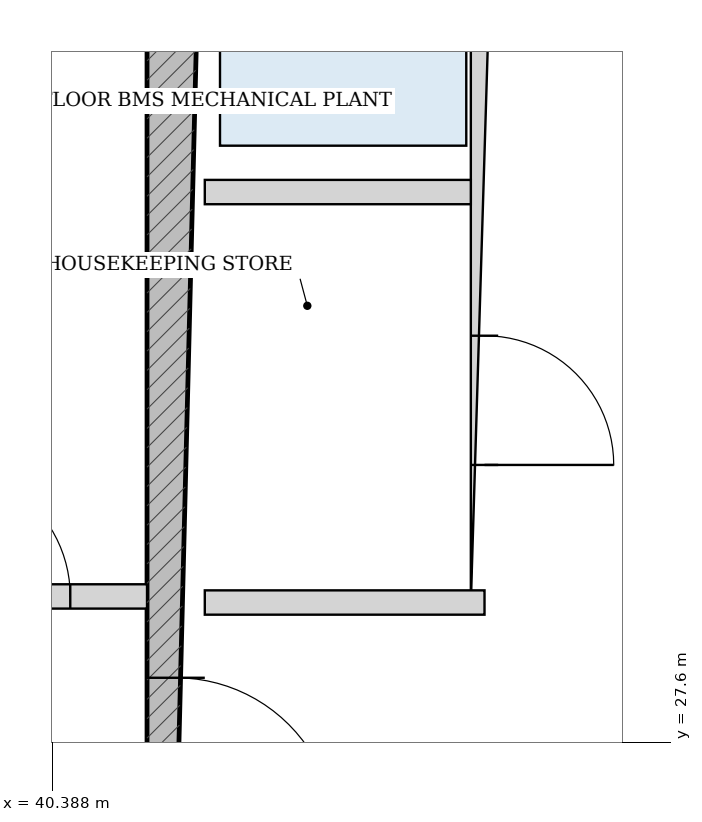
"""IFC4 building model, lengths in metres.
Left out: names, types, materials, properties, quantities, classifications, styles, units other than length and angle.
Written with IfcOpenShell. Run it as: python <this file> out.ifc"""

import sys

from ifc_helpers import new_model, si_unit, direction, frame, frame_2d, origin, place, context, subcontext, project, spatial, rectangle, extrude, source, transform, mapped, element, fill, save


model = new_model("IFC4")
c1 = context("Model", 3, precision=1e-05, world=origin(), true_north=direction((-0.2419218956, 0.970295726276)))
c2 = subcontext(c1, "Body", "Model", "MODEL_VIEW")
j1 = project(units=[si_unit("LENGTHUNIT", "METRE"), si_unit("PLANEANGLEUNIT", "RADIAN")], contexts=[c1])
p1 = place(None, origin())
s1 = spatial("IfcSite", under=j1, at=p1, CompositionType="ELEMENT")
p2 = place(p1, origin())
s2 = spatial("IfcBuilding", under=s1, at=p2, CompositionType="ELEMENT")
p3 = place(p2, frame((0.0, 0.0, 251.95)))
s3 = spatial("IfcBuildingStorey", under=s2, at=p3, CompositionType="ELEMENT", Elevation=251.95)
p4 = place(p3, frame((41.2, 19.175, 0.0), z_axis=(0.0, 0.0, 1.0), x_axis=(0.0, 1.0, 0.0)))
e1 = element("IfcWall", 1, at=p4, inside=s3, PredefinedType="SHEAR", context=c2, shape_type="SweptSolid", body=[
    extrude(rectangle(XDim=15.25, YDim=0.38, at=frame_2d((7.625, 0.0))), origin(), (0.0, 0.0, 1.0), 3.49),
])
p5 = place(p4, frame((7.8, 0.0, 0.0)))
e2 = element("IfcOpeningElement", 2, at=p5, cuts=e1, PredefinedType="OPENING", context=c2, shape_type="SweptSolid", body=[
    extrude(rectangle(XDim=1.05, YDim=2.15, at=frame_2d((0.525, 1.075))), frame((0.0, 0.2, 0.0), z_axis=(0.0, -1.0, 0.0), x_axis=(1.0, 0.0, 0.0)), (0.0, 0.0, 1.0), 0.4),
])
p6 = place(p3, frame((43.23, 28.52, 0.0), z_axis=(0.0, 0.0, 1.0), x_axis=(0.0, 1.0, 0.0)))
e3 = element("IfcWall", 3, at=p6, inside=s3, PredefinedType="PARTITIONING", context=c2, shape_type="SweptSolid", body=[
    extrude(rectangle(XDim=5.905, YDim=0.18, at=frame_2d((2.953, 0.0))), origin(), (0.0, 0.0, 1.0), 3.49),
])
p7 = place(p6, frame((0.905, 0.0, 0.0)))
e4 = element("IfcOpeningElement", 4, at=p7, cuts=e3, PredefinedType="OPENING", context=c2, shape_type="SweptSolid", body=[
    extrude(rectangle(XDim=0.85, YDim=2.1, at=frame_2d((0.425, 1.05))), frame((0.0, 0.1, 0.0), z_axis=(0.0, -1.0, 0.0), x_axis=(1.0, 0.0, 0.0)), (0.0, 0.0, 1.0), 0.2),
])
p8 = place(p6, frame((3.655, 0.0, 0.0)))
e5 = element("IfcOpeningElement", 5, at=p8, cuts=e3, PredefinedType="OPENING", context=c2, shape_type="SweptSolid", body=[
    extrude(rectangle(XDim=1.15, YDim=2.2, at=frame_2d((0.575, 1.1))), frame((0.0, 0.1, 0.0), z_axis=(0.0, -1.0, 0.0), x_axis=(1.0, 0.0, 0.0)), (0.0, 0.0, 1.0), 0.2),
])
p9 = place(p3, frame((41.39, 31.22, 0.0), z_axis=(0.0, 0.0, 1.0), x_axis=(1.0, 0.0, 0.0)))
e6 = element("IfcWall", 6, at=p9, inside=s3, PredefinedType="PARTITIONING", context=c2, shape_type="SweptSolid", body=[
    extrude(rectangle(XDim=1.75, YDim=0.16, at=frame_2d((0.875, 0.0))), origin(), (0.0, 0.0, 1.0), 3.49),
])
p10 = place(p3, frame((41.39, 28.52, 0.0), z_axis=(0.0, 0.0, 1.0), x_axis=(1.0, 0.0, 0.0)))
e7 = element("IfcWall", 7, at=p10, inside=s3, PredefinedType="PARTITIONING", context=c2, shape_type="SweptSolid", body=[
    extrude(rectangle(XDim=1.84, YDim=0.16, at=frame_2d((0.92, 0.0))), origin(), (0.0, 0.0, 1.0), 3.49),
])
p11 = place(p3, frame((34.99, 28.56, 0.0), z_axis=(0.0, 0.0, 1.0), x_axis=(1.0, 0.0, 0.0)))
e8 = element("IfcWall", 8, at=p11, inside=s3, PredefinedType="PARTITIONING", context=c2, shape_type="SweptSolid", body=[
    extrude(rectangle(XDim=6.02, YDim=0.16, at=frame_2d((3.01, 0.0))), origin(), (0.0, 0.0, 1.0), 3.49),
])
p12 = place(p11, frame((0.505, 0.0, 0.0)))
e9 = element("IfcOpeningElement", 9, at=p12, cuts=e8, PredefinedType="OPENING", context=c2, shape_type="SweptSolid", body=[
    extrude(rectangle(XDim=0.85, YDim=2.1, at=frame_2d((0.425, 1.05))), frame((0.0, 0.09, 0.0), z_axis=(0.0, -1.0, 0.0), x_axis=(1.0, 0.0, 0.0)), (0.0, 0.0, 1.0), 0.18),
])
p13 = place(p11, frame((2.58, 0.0, 0.0)))
e10 = element("IfcOpeningElement", 10, at=p13, cuts=e8, PredefinedType="OPENING", context=c2, shape_type="SweptSolid", body=[
    extrude(rectangle(XDim=0.86, YDim=2.1, at=frame_2d((0.43, 1.05))), frame((0.0, 0.09, 0.0), z_axis=(0.0, -1.0, 0.0), x_axis=(1.0, 0.0, 0.0)), (0.0, 0.0, 1.0), 0.18),
])
p14 = place(p11, frame((4.665, 0.0, 0.0)))
e11 = element("IfcOpeningElement", 11, at=p14, cuts=e8, PredefinedType="OPENING", context=c2, shape_type="SweptSolid", body=[
    extrude(rectangle(XDim=0.85, YDim=2.1, at=frame_2d((0.425, 1.05))), frame((0.0, 0.09, 0.0), z_axis=(0.0, -1.0, 0.0), x_axis=(1.0, 0.0, 0.0)), (0.0, 0.0, 1.0), 0.18),
])
m1 = source(origin(), c2, "Body", "SweptSolid", [
    extrude(rectangle(XDim=1.05, YDim=2.15, at=frame_2d((0.525, 1.075))), frame((0.0, 0.025, 0.0), z_axis=(0.0, -1.0, 0.0), x_axis=(1.0, 0.0, 0.0)), (0.0, 0.0, 1.0), 0.05),
])
p15 = place(p5, frame((1.05, 0.0, 0.0), z_axis=(0.0, 0.0, 1.0), x_axis=(-1.0, 0.0, 0.0)))
e12 = element("IfcDoor", 12, at=p15, inside=s3, OperationType="SINGLE_SWING_RIGHT", PredefinedType="DOOR", context=c2, shape_type="MappedRepresentation", body=[
    mapped(m1, transform((0.0, 0.0, 0.0), scale=1.0)),
])
fill(e2, e12)
m2 = source(origin(), c2, "Body", "SweptSolid", [
    extrude(rectangle(XDim=0.85, YDim=2.1, at=frame_2d((0.425, 1.05))), frame((0.0, 0.025, 0.0), z_axis=(0.0, -1.0, 0.0), x_axis=(1.0, 0.0, 0.0)), (0.0, 0.0, 1.0), 0.05),
])
p16 = place(p7, frame((0.85, 0.0, 0.0), z_axis=(0.0, 0.0, 1.0), x_axis=(-1.0, 0.0, 0.0)))
e13 = element("IfcDoor", 13, at=p16, inside=s3, OperationType="SINGLE_SWING_RIGHT", PredefinedType="DOOR", context=c2, shape_type="MappedRepresentation", body=[
    mapped(m2, transform((0.0, 0.0, 0.0), scale=1.0)),
])
fill(e4, e13)
p17 = place(p14, origin())
e14 = element("IfcDoor", 14, at=p17, inside=s3, OperationType="SINGLE_SWING_LEFT", PredefinedType="DOOR", context=c2, shape_type="MappedRepresentation", body=[
    mapped(m2, transform((0.0, 0.0, 0.0), scale=1.0)),
])
fill(e11, e14)
save(model, sys.argv[1])
